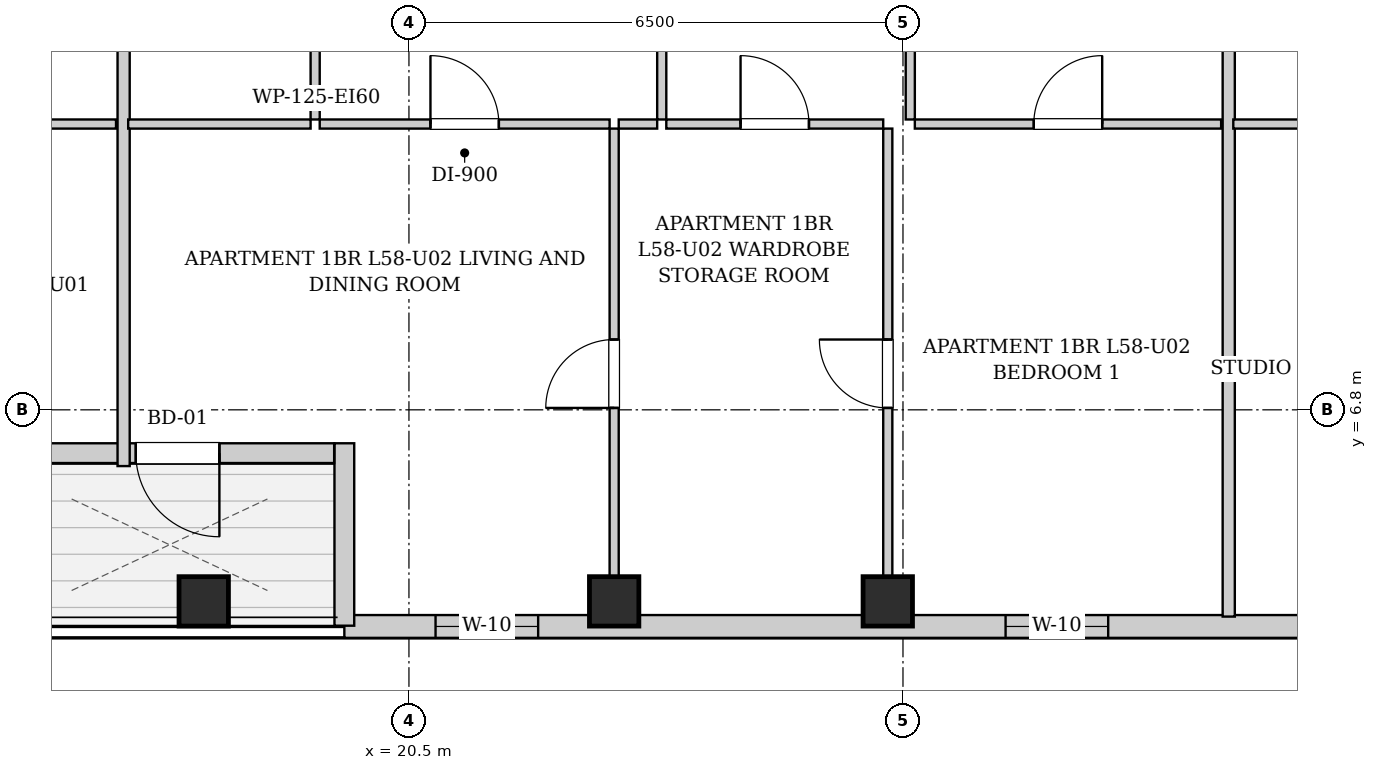
"""IFC4 building model, lengths in metres.
Left out: names, types, materials, properties, quantities, classifications, styles, units other than length and angle.
Written with IfcOpenShell. Run it as: python <this file> out.ifc"""

import sys

from ifc_helpers import new_model, si_unit, direction, frame, frame_2d, origin, origin_2d, place, context, subcontext, project, spatial, rectangle, extrude, element, fill, save


model = new_model("IFC4")
c1 = context("Model", 3, precision=1e-05, world=origin(), true_north=direction((0.0, 1.0)))
c2 = subcontext(c1, "Body", "Model", "MODEL_VIEW")
j1 = project(units=[si_unit("LENGTHUNIT", "METRE"), si_unit("PLANEANGLEUNIT", "RADIAN")], contexts=[c1])
p1 = place(None, origin())
s1 = spatial("IfcSite", under=j1, at=p1, CompositionType="ELEMENT")
p2 = place(p1, origin())
s2 = spatial("IfcBuilding", under=s1, at=p2, CompositionType="ELEMENT")
p3 = place(p2, frame((0.0, 0.0, 200.8)))
s3 = spatial("IfcBuildingStorey", under=s2, at=p3, CompositionType="ELEMENT", Elevation=200.8)
for number, where, z_axis, x_axis in (
    (1, (17.8, 4.28, 0.0), (0.0, 0.0, 1.0), (1.0, 0.0, 0.0)),
    (2, (23.2, 4.28, 0.0), (0.0, 0.0, 1.0), (1.0, 0.0, 0.0)),
    (3, (26.8, 4.28, 0.0), (0.0, 0.0, 1.0), (1.0, 0.0, 0.0)),
):
    element("IfcColumn", number, at=place(p3, frame(where, z_axis=z_axis, x_axis=x_axis)), inside=s3, PredefinedType="COLUMN", context=c2, shape_type="SweptSolid", body=[
        extrude(rectangle(XDim=0.65, YDim=0.65, at=origin_2d()), origin(), (0.0, 0.0, 1.0), 3.3),
    ])
p4 = place(p3, frame((37.8, 3.95, 0.0), z_axis=(0.0, 0.0, 1.0), x_axis=(-1.0, 0.0, 0.0)))
e4 = element("IfcWall", 4, at=p4, inside=s3, PredefinedType="SOLIDWALL", context=c2, shape_type="SweptSolid", body=[
    extrude(rectangle(XDim=18.15, YDim=0.3, at=frame_2d((9.075, 0.0))), origin(), (0.0, 0.0, 1.0), 3.04),
])
p5 = place(p4, frame((15.6, 0.0, 0.55)))
e5 = element("IfcOpeningElement", 5, at=p5, cuts=e4, PredefinedType="OPENING", context=c2, shape_type="SweptSolid", body=[
    extrude(rectangle(XDim=1.35, YDim=1.2, at=frame_2d((0.675, 0.6))), frame((0.0, 0.16, 0.0), z_axis=(0.0, -1.0, 0.0), x_axis=(1.0, 0.0, 0.0)), (0.0, 0.0, 1.0), 0.32),
])
p6 = place(p4, frame((8.1, 0.0, 0.55)))
e6 = element("IfcOpeningElement", 6, at=p6, cuts=e4, PredefinedType="OPENING", context=c2, shape_type="SweptSolid", body=[
    extrude(rectangle(XDim=1.35, YDim=1.2, at=frame_2d((0.675, 0.6))), frame((0.0, 0.16, 0.0), z_axis=(0.0, -1.0, 0.0), x_axis=(1.0, 0.0, 0.0)), (0.0, 0.0, 1.0), 0.32),
])
p7 = place(p4, frame((2.7, 0.0, 0.55)))
e7 = element("IfcOpeningElement", 7, at=p7, cuts=e4, PredefinedType="OPENING", context=c2, shape_type="SweptSolid", body=[
    extrude(rectangle(XDim=1.35, YDim=1.2, at=frame_2d((0.675, 0.6))), frame((0.0, 0.16, 0.0), z_axis=(0.0, -1.0, 0.0), x_axis=(1.0, 0.0, 0.0)), (0.0, 0.0, 1.0), 0.32),
])
p8 = place(p4, frame((1.035, 0.0, 0.55)))
e8 = element("IfcOpeningElement", 8, at=p8, cuts=e4, PredefinedType="OPENING", context=c2, shape_type="SweptSolid", body=[
    extrude(rectangle(XDim=1.35, YDim=1.2, at=frame_2d((0.675, 0.6))), frame((0.0, 0.16, 0.0), z_axis=(0.0, -1.0, 0.0), x_axis=(1.0, 0.0, 0.0)), (0.0, 0.0, 1.0), 0.32),
])
p9 = place(p3, frame((19.65, 3.96, 0.0), z_axis=(0.0, 0.0, 1.0), x_axis=(0.0, 1.0, 0.0)))
e9 = element("IfcWall", 9, at=p9, inside=s3, PredefinedType="SOLIDWALL", context=c2, shape_type="SweptSolid", body=[
    extrude(rectangle(XDim=2.4, YDim=0.26, at=frame_2d((1.2, 0.0))), origin(), (0.0, 0.0, 1.0), 3.04),
])
p10 = place(p3, frame((19.516, 6.23, 0.0), z_axis=(0.0, 0.0, 1.0), x_axis=(-1.0, 0.0, 0.0)))
e10 = element("IfcWall", 10, at=p10, inside=s3, PredefinedType="SOLIDWALL", context=c2, shape_type="SweptSolid", body=[
    extrude(rectangle(XDim=4.332, YDim=0.26, at=frame_2d((2.166, 0.0))), origin(), (0.0, 0.0, 1.0), 3.04),
])
p11 = place(p10, frame((1.51, 0.0, 0.0)))
e11 = element("IfcOpeningElement", 11, at=p11, cuts=e10, PredefinedType="OPENING", context=c2, shape_type="SweptSolid", body=[
    extrude(rectangle(XDim=1.1, YDim=2.0, at=frame_2d((0.55, 1.0))), frame((0.0, 0.14, 0.0), z_axis=(0.0, -1.0, 0.0), x_axis=(1.0, 0.0, 0.0)), (0.0, 0.0, 1.0), 0.28),
])
p12 = place(p3, frame((13.03, 10.56, 0.0), z_axis=(0.0, 0.0, 1.0), x_axis=(1.0, 0.0, 0.0)))
e12 = element("IfcWall", 12, at=p12, inside=s3, PredefinedType="PARTITIONING", context=c2, shape_type="SweptSolid", body=[
    extrude(rectangle(XDim=3.616, YDim=0.12, at=frame_2d((1.808, 0.0))), origin(), (0.0, 0.0, 1.0), 3.04),
])
p13 = place(p12, frame((1.358, 0.0, 0.0)))
e13 = element("IfcOpeningElement", 13, at=p13, cuts=e12, PredefinedType="OPENING", context=c2, shape_type="SweptSolid", body=[
    extrude(rectangle(XDim=0.9, YDim=2.05, at=frame_2d((0.45, 1.025))), frame((0.0, 0.07, 0.0), z_axis=(0.0, -1.0, 0.0), x_axis=(1.0, 0.0, 0.0)), (0.0, 0.0, 1.0), 0.14),
])
p14 = place(p3, frame((16.746, 6.06, 0.0), z_axis=(0.0, 0.0, 1.0), x_axis=(0.0, 1.0, 0.0)))
e14 = element("IfcWall", 14, at=p14, inside=s3, PredefinedType="PARTITIONING", context=c2, shape_type="SweptSolid", body=[
    extrude(rectangle(XDim=7.41, YDim=0.16, at=frame_2d((3.705, 0.0))), origin(), (0.0, 0.0, 1.0), 3.04),
])
p15 = place(p3, frame((19.266, 10.62, 0.0), z_axis=(0.0, 0.0, 1.0), x_axis=(0.0, 1.0, 0.0)))
e15 = element("IfcWall", 15, at=p15, inside=s3, PredefinedType="PARTITIONING", context=c2, shape_type="SweptSolid", body=[
    extrude(rectangle(XDim=2.85, YDim=0.12, at=frame_2d((1.425, 0.0))), origin(), (0.0, 0.0, 1.0), 3.04),
])
p16 = place(p15, frame((0.995, 0.0, 0.0)))
e16 = element("IfcOpeningElement", 16, at=p16, cuts=e15, PredefinedType="OPENING", context=c2, shape_type="SweptSolid", body=[
    extrude(rectangle(XDim=0.86, YDim=2.05, at=frame_2d((0.43, 1.025))), frame((0.0, 0.07, 0.0), z_axis=(0.0, -1.0, 0.0), x_axis=(1.0, 0.0, 0.0)), (0.0, 0.0, 1.0), 0.14),
])
p17 = place(p3, frame((16.806, 10.56, 0.0), z_axis=(0.0, 0.0, 1.0), x_axis=(1.0, 0.0, 0.0)))
e17 = element("IfcWall", 17, at=p17, inside=s3, PredefinedType="PARTITIONING", context=c2, shape_type="SweptSolid", body=[
    extrude(rectangle(XDim=2.4, YDim=0.12, at=frame_2d((1.2, 0.0))), origin(), (0.0, 0.0, 1.0), 3.04),
])
p18 = place(p3, frame((23.826, 10.62, 0.0), z_axis=(0.0, 0.0, 1.0), x_axis=(0.0, 1.0, 0.0)))
e18 = element("IfcWall", 18, at=p18, inside=s3, PredefinedType="PARTITIONING", context=c2, shape_type="SweptSolid", body=[
    extrude(rectangle(XDim=2.85, YDim=0.12, at=frame_2d((1.425, 0.0))), origin(), (0.0, 0.0, 1.0), 3.04),
])
p19 = place(p18, frame((0.975, 0.0, 0.0)))
e19 = element("IfcOpeningElement", 19, at=p19, cuts=e18, PredefinedType="OPENING", context=c2, shape_type="SweptSolid", body=[
    extrude(rectangle(XDim=0.9, YDim=2.05, at=frame_2d((0.45, 1.025))), frame((0.0, 0.07, 0.0), z_axis=(0.0, -1.0, 0.0), x_axis=(1.0, 0.0, 0.0)), (0.0, 0.0, 1.0), 0.14),
])
p20 = place(p3, frame((19.326, 10.56, 0.0), z_axis=(0.0, 0.0, 1.0), x_axis=(1.0, 0.0, 0.0)))
e20 = element("IfcWall", 20, at=p20, inside=s3, PredefinedType="PARTITIONING", context=c2, shape_type="SweptSolid", body=[
    extrude(rectangle(XDim=3.814, YDim=0.12, at=frame_2d((1.907, 0.0))), origin(), (0.0, 0.0, 1.0), 3.04),
])
p21 = place(p20, frame((1.457, 0.0, 0.0)))
e21 = element("IfcOpeningElement", 21, at=p21, cuts=e20, PredefinedType="OPENING", context=c2, shape_type="SweptSolid", body=[
    extrude(rectangle(XDim=0.9, YDim=2.05, at=frame_2d((0.45, 1.025))), frame((0.0, 0.07, 0.0), z_axis=(0.0, -1.0, 0.0), x_axis=(1.0, 0.0, 0.0)), (0.0, 0.0, 1.0), 0.14),
])
p22 = place(p3, frame((23.26, 10.56, 0.0), z_axis=(0.0, 0.0, 1.0), x_axis=(1.0, 0.0, 0.0)))
e22 = element("IfcWall", 22, at=p22, inside=s3, PredefinedType="PARTITIONING", context=c2, shape_type="SweptSolid", body=[
    extrude(rectangle(XDim=0.506, YDim=0.12, at=frame_2d((0.253, 0.0))), origin(), (0.0, 0.0, 1.0), 3.04),
])
p23 = place(p3, frame((27.096, 10.62, 0.0), z_axis=(0.0, 0.0, 1.0), x_axis=(0.0, 1.0, 0.0)))
e23 = element("IfcWall", 23, at=p23, inside=s3, PredefinedType="PARTITIONING", context=c2, shape_type="SweptSolid", body=[
    extrude(rectangle(XDim=2.85, YDim=0.12, at=frame_2d((1.425, 0.0))), origin(), (0.0, 0.0, 1.0), 3.04),
])
p24 = place(p23, frame((0.975, 0.0, 0.0)))
e24 = element("IfcOpeningElement", 24, at=p24, cuts=e23, PredefinedType="OPENING", context=c2, shape_type="SweptSolid", body=[
    extrude(rectangle(XDim=0.9, YDim=2.05, at=frame_2d((0.45, 1.025))), frame((0.0, 0.07, 0.0), z_axis=(0.0, -1.0, 0.0), x_axis=(1.0, 0.0, 0.0)), (0.0, 0.0, 1.0), 0.14),
])
p25 = place(p3, frame((23.886, 10.56, 0.0), z_axis=(0.0, 0.0, 1.0), x_axis=(1.0, 0.0, 0.0)))
e25 = element("IfcWall", 25, at=p25, inside=s3, PredefinedType="PARTITIONING", context=c2, shape_type="SweptSolid", body=[
    extrude(rectangle(XDim=2.854, YDim=0.12, at=frame_2d((1.427, 0.0))), origin(), (0.0, 0.0, 1.0), 3.04),
])
p26 = place(p25, frame((0.977, 0.0, 0.0)))
e26 = element("IfcOpeningElement", 26, at=p26, cuts=e25, PredefinedType="OPENING", context=c2, shape_type="SweptSolid", body=[
    extrude(rectangle(XDim=0.9, YDim=2.05, at=frame_2d((0.45, 1.025))), frame((0.0, 0.07, 0.0), z_axis=(0.0, -1.0, 0.0), x_axis=(1.0, 0.0, 0.0)), (0.0, 0.0, 1.0), 0.14),
])
p27 = place(p3, frame((27.156, 10.56, 0.0), z_axis=(0.0, 0.0, 1.0), x_axis=(1.0, 0.0, 0.0)))
e27 = element("IfcWall", 27, at=p27, inside=s3, PredefinedType="PARTITIONING", context=c2, shape_type="SweptSolid", body=[
    extrude(rectangle(XDim=4.03, YDim=0.12, at=frame_2d((2.015, 0.0))), origin(), (0.0, 0.0, 1.0), 3.04),
])
p28 = place(p27, frame((1.565, 0.0, 0.0)))
e28 = element("IfcOpeningElement", 28, at=p28, cuts=e27, PredefinedType="OPENING", context=c2, shape_type="SweptSolid", body=[
    extrude(rectangle(XDim=0.9, YDim=2.05, at=frame_2d((0.45, 1.025))), frame((0.0, 0.07, 0.0), z_axis=(0.0, -1.0, 0.0), x_axis=(1.0, 0.0, 0.0)), (0.0, 0.0, 1.0), 0.14),
])
p29 = place(p3, frame((23.2, 4.08, 0.0), z_axis=(0.0, 0.0, 1.0), x_axis=(0.0, 1.0, 0.0)))
e29 = element("IfcWall", 29, at=p29, inside=s3, PredefinedType="PARTITIONING", context=c2, shape_type="SweptSolid", body=[
    extrude(rectangle(XDim=6.42, YDim=0.12, at=frame_2d((3.21, 0.0))), origin(), (0.0, 0.0, 1.0), 3.04),
])
p30 = place(p29, frame((2.745, 0.0, 0.0)))
e30 = element("IfcOpeningElement", 30, at=p30, cuts=e29, PredefinedType="OPENING", context=c2, shape_type="SweptSolid", body=[
    extrude(rectangle(XDim=0.9, YDim=2.05, at=frame_2d((0.45, 1.025))), frame((0.0, 0.07, 0.0), z_axis=(0.0, -1.0, 0.0), x_axis=(1.0, 0.0, 0.0)), (0.0, 0.0, 1.0), 0.14),
])
p31 = place(p3, frame((26.8, 4.08, 0.0), z_axis=(0.0, 0.0, 1.0), x_axis=(0.0, 1.0, 0.0)))
e31 = element("IfcWall", 31, at=p31, inside=s3, PredefinedType="PARTITIONING", context=c2, shape_type="SweptSolid", body=[
    extrude(rectangle(XDim=6.42, YDim=0.12, at=frame_2d((3.21, 0.0))), origin(), (0.0, 0.0, 1.0), 3.04),
])
p32 = place(p31, frame((2.745, 0.0, 0.0)))
e32 = element("IfcOpeningElement", 32, at=p32, cuts=e31, PredefinedType="OPENING", context=c2, shape_type="SweptSolid", body=[
    extrude(rectangle(XDim=0.9, YDim=2.05, at=frame_2d((0.45, 1.025))), frame((0.0, 0.07, 0.0), z_axis=(0.0, -1.0, 0.0), x_axis=(1.0, 0.0, 0.0)), (0.0, 0.0, 1.0), 0.14),
])
p33 = place(p3, frame((31.286, 4.08, 0.0), z_axis=(0.0, 0.0, 1.0), x_axis=(0.0, 1.0, 0.0)))
e33 = element("IfcWall", 33, at=p33, inside=s3, PredefinedType="PARTITIONING", context=c2, shape_type="SweptSolid", body=[
    extrude(rectangle(XDim=9.39, YDim=0.16, at=frame_2d((4.695, 0.0))), origin(), (0.0, 0.0, 1.0), 3.04),
])
p34 = place(p3, frame((31.346, 10.56, 0.0), z_axis=(0.0, 0.0, 1.0), x_axis=(1.0, 0.0, 0.0)))
e34 = element("IfcWall", 34, at=p34, inside=s3, PredefinedType="PARTITIONING", context=c2, shape_type="SweptSolid", body=[
    extrude(rectangle(XDim=1.912, YDim=0.12, at=frame_2d((0.956, 0.0))), origin(), (0.0, 0.0, 1.0), 3.04),
])
p35 = place(p21, origin())
e35 = element("IfcDoor", 35, at=p35, inside=s3, OperationType="SINGLE_SWING_LEFT", PredefinedType="DOOR", context=c2, shape_type="SweptSolid", body=[
    extrude(rectangle(XDim=0.9, YDim=2.05, at=frame_2d((0.45, 1.025))), frame((0.0, 0.025, 0.0), z_axis=(0.0, -1.0, 0.0), x_axis=(1.0, 0.0, 0.0)), (0.0, 0.0, 1.0), 0.05),
])
fill(e21, e35)
p36 = place(p26, origin())
e36 = element("IfcDoor", 36, at=p36, inside=s3, OperationType="SINGLE_SWING_LEFT", PredefinedType="DOOR", context=c2, shape_type="SweptSolid", body=[
    extrude(rectangle(XDim=0.9, YDim=2.05, at=frame_2d((0.45, 1.025))), frame((0.0, 0.025, 0.0), z_axis=(0.0, -1.0, 0.0), x_axis=(1.0, 0.0, 0.0)), (0.0, 0.0, 1.0), 0.05),
])
fill(e26, e36)
p37 = place(p28, origin())
e37 = element("IfcDoor", 37, at=p37, inside=s3, OperationType="SINGLE_SWING_RIGHT", PredefinedType="DOOR", context=c2, shape_type="SweptSolid", body=[
    extrude(rectangle(XDim=0.9, YDim=2.05, at=frame_2d((0.45, 1.025))), frame((0.0, 0.025, 0.0), z_axis=(0.0, -1.0, 0.0), x_axis=(1.0, 0.0, 0.0)), (0.0, 0.0, 1.0), 0.05),
])
fill(e28, e37)
p38 = place(p30, origin())
e38 = element("IfcDoor", 38, at=p38, inside=s3, OperationType="SINGLE_SWING_LEFT", PredefinedType="DOOR", context=c2, shape_type="SweptSolid", body=[
    extrude(rectangle(XDim=0.9, YDim=2.05, at=frame_2d((0.45, 1.025))), frame((0.0, 0.025, 0.0), z_axis=(0.0, -1.0, 0.0), x_axis=(1.0, 0.0, 0.0)), (0.0, 0.0, 1.0), 0.05),
])
fill(e30, e38)
p39 = place(p32, origin())
e39 = element("IfcDoor", 39, at=p39, inside=s3, OperationType="SINGLE_SWING_RIGHT", PredefinedType="DOOR", context=c2, shape_type="SweptSolid", body=[
    extrude(rectangle(XDim=0.9, YDim=2.05, at=frame_2d((0.45, 1.025))), frame((0.0, 0.025, 0.0), z_axis=(0.0, -1.0, 0.0), x_axis=(1.0, 0.0, 0.0)), (0.0, 0.0, 1.0), 0.05),
])
fill(e32, e39)
p40 = place(p11, origin())
e40 = element("IfcDoor", 40, at=p40, inside=s3, OperationType="SINGLE_SWING_LEFT", PredefinedType="DOOR", context=c2, shape_type="SweptSolid", body=[
    extrude(rectangle(XDim=1.1, YDim=2.0, at=frame_2d((0.55, 1.0))), frame((0.0, 0.025, 0.0), z_axis=(0.0, -1.0, 0.0), x_axis=(1.0, 0.0, 0.0)), (0.0, 0.0, 1.0), 0.05),
])
fill(e11, e40)
p41 = place(p5, origin())
e41 = element("IfcWindow", 41, at=p41, inside=s3, PartitioningType="SINGLE_PANEL", PredefinedType="WINDOW", context=c2, shape_type="SweptSolid", body=[
    extrude(rectangle(XDim=1.35, YDim=1.2, at=frame_2d((0.675, 0.6))), frame((0.0, 0.03, 0.0), z_axis=(0.0, -1.0, 0.0), x_axis=(1.0, 0.0, 0.0)), (0.0, 0.0, 1.0), 0.06),
])
fill(e5, e41)
p42 = place(p6, origin())
e42 = element("IfcWindow", 42, at=p42, inside=s3, PartitioningType="SINGLE_PANEL", PredefinedType="WINDOW", context=c2, shape_type="SweptSolid", body=[
    extrude(rectangle(XDim=1.35, YDim=1.2, at=frame_2d((0.675, 0.6))), frame((0.0, 0.03, 0.0), z_axis=(0.0, -1.0, 0.0), x_axis=(1.0, 0.0, 0.0)), (0.0, 0.0, 1.0), 0.06),
])
fill(e6, e42)
save(model, sys.argv[1])
